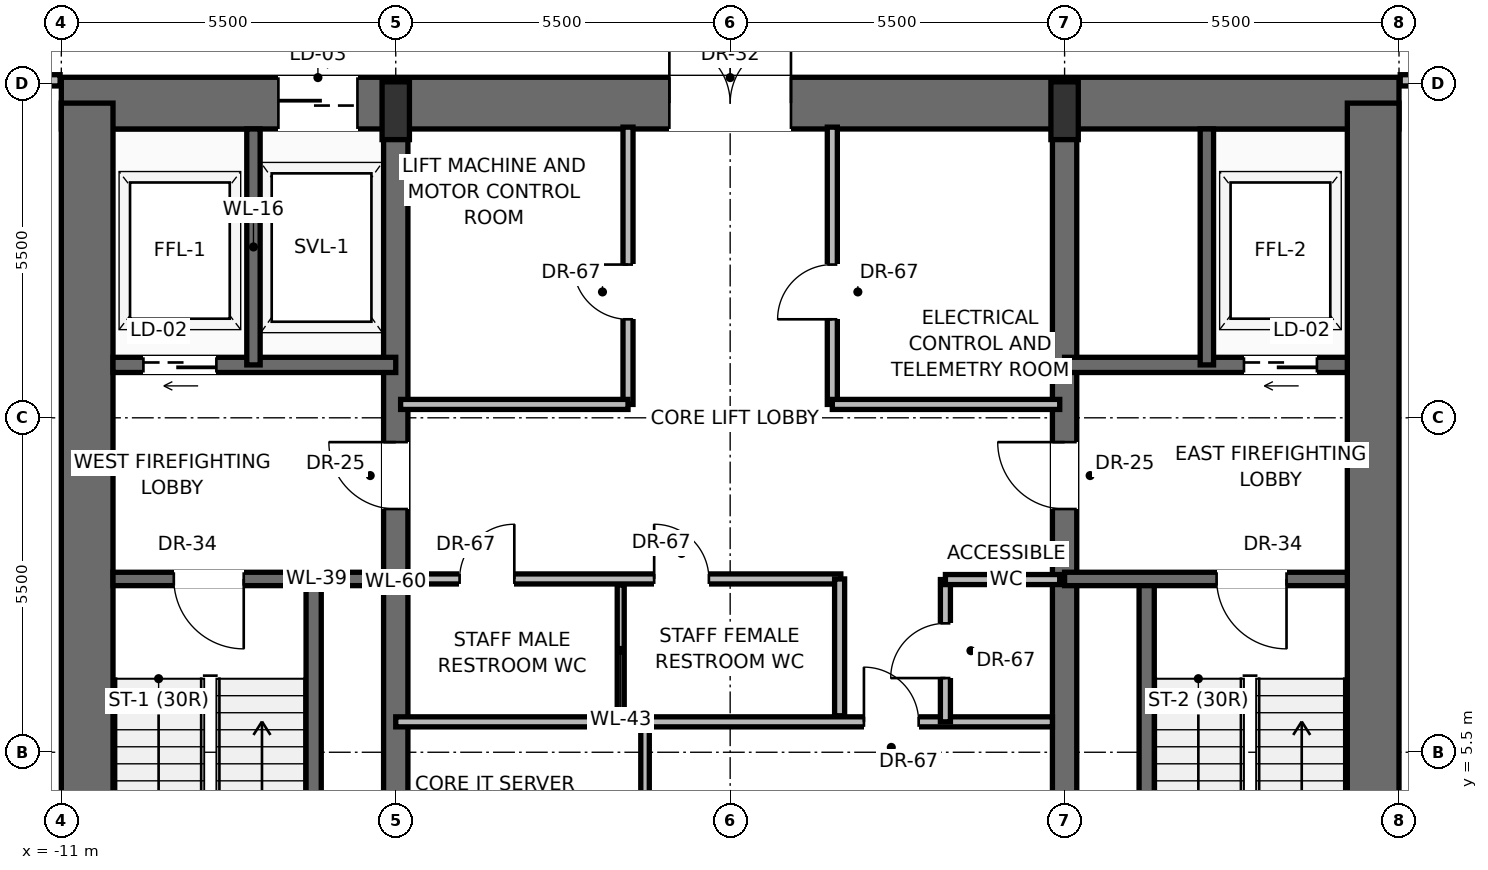
"""IFC4 building model, lengths in metres.
Left out: names, types, materials, properties, quantities, classifications, styles, units other than length and angle.
Written with IfcOpenShell. Run it as: python <this file> out.ifc"""

import sys

from ifc_helpers import new_model, si_unit, direction, frame, frame_2d, origin, origin_2d, place, context, subcontext, project, spatial, rectangle, extrude, source, transform, mapped, element, fill, save


model = new_model("IFC4")
c1 = context("Model", 3, precision=1e-05, world=origin(), true_north=direction((0.0, 1.0)))
c2 = subcontext(c1, "Body", "Model", "MODEL_VIEW")
j1 = project(units=[si_unit("LENGTHUNIT", "METRE"), si_unit("PLANEANGLEUNIT", "RADIAN")], contexts=[c1])
p1 = place(None, origin())
s1 = spatial("IfcSite", under=j1, at=p1, CompositionType="ELEMENT")
p2 = place(p1, origin())
s2 = spatial("IfcBuilding", under=s1, at=p2, CompositionType="ELEMENT")
p3 = place(p2, frame((0.0, 0.0, -10.0)))
s3 = spatial("IfcBuildingStorey", under=s2, at=p3, CompositionType="ELEMENT", Elevation=-10.0)
p4 = place(p3, frame((-11.0, 16.175, 0.0), z_axis=(0.0, 0.0, 1.0), x_axis=(1.0, 0.0, 0.0)))
e1 = element("IfcWall", 1, at=p4, inside=s3, PredefinedType="SHEAR", context=c2, shape_type="SweptSolid", body=[
    extrude(rectangle(XDim=22.0, YDim=0.85, at=frame_2d((11.0, 0.0))), origin(), (0.0, 0.0, 1.0), 4.6),
])
p5 = place(p4, frame((3.57, 0.0, 0.0)))
e2 = element("IfcOpeningElement", 2, at=p5, cuts=e1, PredefinedType="OPENING", context=c2, shape_type="SweptSolid", body=[
    extrude(rectangle(XDim=1.3, YDim=2.3, at=frame_2d((0.65, 1.15))), frame((0.0, 0.435, 0.0), z_axis=(0.0, -1.0, 0.0), x_axis=(1.0, 0.0, 0.0)), (0.0, 0.0, 1.0), 0.87),
])
p6 = place(p4, frame((10.0, 0.0, 0.0)))
e3 = element("IfcOpeningElement", 3, at=p6, cuts=e1, PredefinedType="OPENING", context=c2, shape_type="SweptSolid", body=[
    extrude(rectangle(XDim=2.0, YDim=2.4, at=frame_2d((1.0, 1.2))), frame((0.0, 0.435, 0.0), z_axis=(0.0, -1.0, 0.0), x_axis=(1.0, 0.0, 0.0)), (0.0, 0.0, 1.0), 0.87),
])
for number, where, z_axis, x_axis in (
    (4, (-10.575, 0.425, 0.0), (0.0, 0.0, 1.0), (0.0, 1.0, 0.0)),
    (5, (10.575, 0.425, 0.0), (0.0, 0.0, 1.0), (0.0, 1.0, 0.0)),
):
    element("IfcWall", number, at=place(p3, frame(where, z_axis=z_axis, x_axis=x_axis)), inside=s3, PredefinedType="SHEAR", context=c2, shape_type="SweptSolid", body=[
        extrude(rectangle(XDim=15.75, YDim=0.85, at=frame_2d((7.875, 0.0))), origin(), (0.0, 0.0, 1.0), 4.6),
    ])
p7 = place(p3, frame((-5.5, 0.425, 0.0), z_axis=(0.0, 0.0, 1.0), x_axis=(0.0, 1.0, 0.0)))
e6 = element("IfcWall", 6, at=p7, inside=s3, PredefinedType="SHEAR", context=c2, shape_type="SweptSolid", body=[
    extrude(rectangle(XDim=15.75, YDim=0.4, at=frame_2d((7.875, 0.0))), origin(), (0.0, 0.0, 1.0), 4.6),
])
p8 = place(p7, frame((9.075, 0.0, 0.0)))
e7 = element("IfcOpeningElement", 7, at=p8, cuts=e6, PredefinedType="OPENING", context=c2, shape_type="SweptSolid", body=[
    extrude(rectangle(XDim=1.1, YDim=2.2, at=frame_2d((0.55, 1.1))), frame((0.0, 0.21, 0.0), z_axis=(0.0, -1.0, 0.0), x_axis=(1.0, 0.0, 0.0)), (0.0, 0.0, 1.0), 0.42),
])
p9 = place(p3, frame((5.5, 0.425, 0.0), z_axis=(0.0, 0.0, 1.0), x_axis=(0.0, 1.0, 0.0)))
e8 = element("IfcWall", 8, at=p9, inside=s3, PredefinedType="SHEAR", context=c2, shape_type="SweptSolid", body=[
    extrude(rectangle(XDim=15.75, YDim=0.4, at=frame_2d((7.875, 0.0))), origin(), (0.0, 0.0, 1.0), 4.6),
])
p10 = place(p9, frame((9.075, 0.0, 0.0)))
e9 = element("IfcOpeningElement", 9, at=p10, cuts=e8, PredefinedType="OPENING", context=c2, shape_type="SweptSolid", body=[
    extrude(rectangle(XDim=1.1, YDim=2.2, at=frame_2d((0.55, 1.1))), frame((0.0, 0.21, 0.0), z_axis=(0.0, -1.0, 0.0), x_axis=(1.0, 0.0, 0.0)), (0.0, 0.0, 1.0), 0.42),
])
m1 = source(origin(), c2, "Body", "SweptSolid", [
    extrude(rectangle(XDim=0.45, YDim=0.95, at=origin_2d()), origin(), (0.0, 0.0, 1.0), 5.0),
])
for number, where, z_axis, x_axis in (
    (10, (-5.5, 16.05, 0.0), (0.0, 0.0, 1.0), (1.0, 0.0, 0.0)),
    (11, (5.5, 16.05, 0.0), (0.0, 0.0, 1.0), (1.0, 0.0, 0.0)),
):
    element("IfcColumn", number, at=place(p3, frame(where, z_axis=z_axis, x_axis=x_axis)), inside=s3, PredefinedType="PILASTER", context=c2, shape_type="MappedRepresentation", body=[
        mapped(m1, transform((0.0, 0.0, 0.0), scale=1.0)),
    ])
p11 = place(p3, frame((-6.85, 0.85, 0.0), z_axis=(0.0, 0.0, 1.0), x_axis=(0.0, 1.0, 0.0)))
e12 = element("IfcWall", 12, at=p11, inside=s3, PredefinedType="SOLIDWALL", context=c2, shape_type="SweptSolid", body=[
    extrude(rectangle(XDim=7.5, YDim=0.25, at=frame_2d((3.75, 0.0))), origin(), (0.0, 0.0, 1.0), 4.6),
])
p12 = place(p3, frame((-5.5, 8.35, 0.0), z_axis=(0.0, 0.0, 1.0), x_axis=(-1.0, 0.0, 0.0)))
e13 = element("IfcWall", 13, at=p12, inside=s3, PredefinedType="SOLIDWALL", context=c2, shape_type="SweptSolid", body=[
    extrude(rectangle(XDim=4.65, YDim=0.22, at=frame_2d((2.325, 0.0))), origin(), (0.0, 0.0, 1.0), 4.6),
])
p13 = place(p12, frame((2.5, 0.0, 0.0)))
e14 = element("IfcOpeningElement", 14, at=p13, cuts=e13, PredefinedType="OPENING", context=c2, shape_type="SweptSolid", body=[
    extrude(rectangle(XDim=1.15, YDim=2.2, at=frame_2d((0.575, 1.1))), frame((0.0, 0.12, 0.0), z_axis=(0.0, -1.0, 0.0), x_axis=(1.0, 0.0, 0.0)), (0.0, 0.0, 1.0), 0.24),
])
p14 = place(p3, frame((-5.5, 11.87, 0.0), z_axis=(0.0, 0.0, 1.0), x_axis=(-1.0, 0.0, 0.0)))
e15 = element("IfcWall", 15, at=p14, inside=s3, PredefinedType="SOLIDWALL", context=c2, shape_type="SweptSolid", body=[
    extrude(rectangle(XDim=4.65, YDim=0.25, at=frame_2d((2.325, 0.0))), origin(), (0.0, 0.0, 1.0), 4.6),
])
p15 = place(p14, frame((2.95, 0.0, 0.0)))
e16 = element("IfcOpeningElement", 16, at=p15, cuts=e15, PredefinedType="OPENING", context=c2, shape_type="SweptSolid", body=[
    extrude(rectangle(XDim=1.2, YDim=2.25, at=frame_2d((0.6, 1.125))), frame((0.0, 0.135, 0.0), z_axis=(0.0, -1.0, 0.0), x_axis=(1.0, 0.0, 0.0)), (0.0, 0.0, 1.0), 0.27),
])
p16 = place(p3, frame((-7.84, 11.87, 0.0), z_axis=(0.0, 0.0, 1.0), x_axis=(0.0, 1.0, 0.0)))
e17 = element("IfcWall", 17, at=p16, inside=s3, PredefinedType="SOLIDWALL", context=c2, shape_type="SweptSolid", body=[
    extrude(rectangle(XDim=3.88, YDim=0.22, at=frame_2d((1.94, 0.0))), origin(), (0.0, 0.0, 1.0), 4.6),
])
p17 = place(p3, frame((6.85, 0.85, 0.0), z_axis=(0.0, 0.0, 1.0), x_axis=(0.0, 1.0, 0.0)))
e18 = element("IfcWall", 18, at=p17, inside=s3, PredefinedType="SOLIDWALL", context=c2, shape_type="SweptSolid", body=[
    extrude(rectangle(XDim=7.5, YDim=0.25, at=frame_2d((3.75, 0.0))), origin(), (0.0, 0.0, 1.0), 4.6),
])
p18 = place(p3, frame((10.15, 8.35, 0.0), z_axis=(0.0, 0.0, 1.0), x_axis=(-1.0, 0.0, 0.0)))
e19 = element("IfcWall", 19, at=p18, inside=s3, PredefinedType="SOLIDWALL", context=c2, shape_type="SweptSolid", body=[
    extrude(rectangle(XDim=4.65, YDim=0.22, at=frame_2d((2.325, 0.0))), origin(), (0.0, 0.0, 1.0), 4.6),
])
p19 = place(p18, frame((1.0, 0.0, 0.0)))
e20 = element("IfcOpeningElement", 20, at=p19, cuts=e19, PredefinedType="OPENING", context=c2, shape_type="SweptSolid", body=[
    extrude(rectangle(XDim=1.15, YDim=2.2, at=frame_2d((0.575, 1.1))), frame((0.0, 0.12, 0.0), z_axis=(0.0, -1.0, 0.0), x_axis=(1.0, 0.0, 0.0)), (0.0, 0.0, 1.0), 0.24),
])
p20 = place(p3, frame((10.15, 11.87, 0.0), z_axis=(0.0, 0.0, 1.0), x_axis=(-1.0, 0.0, 0.0)))
e21 = element("IfcWall", 21, at=p20, inside=s3, PredefinedType="SOLIDWALL", context=c2, shape_type="SweptSolid", body=[
    extrude(rectangle(XDim=4.65, YDim=0.25, at=frame_2d((2.325, 0.0))), origin(), (0.0, 0.0, 1.0), 4.6),
])
p21 = place(p20, frame((0.5, 0.0, 0.0)))
e22 = element("IfcOpeningElement", 22, at=p21, cuts=e21, PredefinedType="OPENING", context=c2, shape_type="SweptSolid", body=[
    extrude(rectangle(XDim=1.2, YDim=2.25, at=frame_2d((0.6, 1.125))), frame((0.0, 0.135, 0.0), z_axis=(0.0, -1.0, 0.0), x_axis=(1.0, 0.0, 0.0)), (0.0, 0.0, 1.0), 0.27),
])
p22 = place(p3, frame((7.84, 11.87, 0.0), z_axis=(0.0, 0.0, 1.0), x_axis=(0.0, 1.0, 0.0)))
e23 = element("IfcWall", 23, at=p22, inside=s3, PredefinedType="SOLIDWALL", context=c2, shape_type="SweptSolid", body=[
    extrude(rectangle(XDim=3.88, YDim=0.22, at=frame_2d((1.94, 0.0))), origin(), (0.0, 0.0, 1.0), 4.6),
])
p23 = place(p3, frame((-5.5, 6.0, 0.0), z_axis=(0.0, 0.0, 1.0), x_axis=(1.0, 0.0, 0.0)))
e24 = element("IfcWall", 24, at=p23, inside=s3, PredefinedType="PARTITIONING", context=c2, shape_type="SweptSolid", body=[
    extrude(rectangle(XDim=10.8, YDim=0.165, at=frame_2d((5.4, 0.0))), origin(), (0.0, 0.0, 1.0), 4.592),
])
p24 = place(p23, frame((7.7, 0.0, 0.0)))
e25 = element("IfcOpeningElement", 25, at=p24, cuts=e24, PredefinedType="OPENING", context=c2, shape_type="SweptSolid", body=[
    extrude(rectangle(XDim=0.9, YDim=2.1, at=frame_2d((0.45, 1.05))), frame((0.0, 0.093, 0.0), z_axis=(0.0, -1.0, 0.0), x_axis=(1.0, 0.0, 0.0)), (0.0, 0.0, 1.0), 0.185),
])
p25 = place(p3, frame((-1.4, 0.85, 0.0), z_axis=(0.0, 0.0, 1.0), x_axis=(0.0, 1.0, 0.0)))
e26 = element("IfcWall", 26, at=p25, inside=s3, PredefinedType="PARTITIONING", context=c2, shape_type="SweptSolid", body=[
    extrude(rectangle(XDim=5.03, YDim=0.14, at=frame_2d((2.515, 0.0))), origin(), (0.0, 0.0, 1.0), 4.592),
])
p26 = place(p25, frame((2.1, 0.0, 0.0)))
e27 = element("IfcOpeningElement", 27, at=p26, cuts=e26, PredefinedType="OPENING", context=c2, shape_type="SweptSolid", body=[
    extrude(rectangle(XDim=0.9, YDim=2.1, at=frame_2d((0.45, 1.05))), frame((0.0, 0.08, 0.0), z_axis=(0.0, -1.0, 0.0), x_axis=(1.0, 0.0, 0.0)), (0.0, 0.0, 1.0), 0.16),
])
p27 = place(p3, frame((3.54, 6.0, 0.0), z_axis=(0.0, 0.0, 1.0), x_axis=(0.0, 1.0, 0.0)))
e28 = element("IfcWall", 28, at=p27, inside=s3, PredefinedType="PARTITIONING", context=c2, shape_type="SweptSolid", body=[
    extrude(rectangle(XDim=2.34, YDim=0.165, at=frame_2d((1.17, 0.0))), origin(), (0.0, 0.0, 1.0), 4.592),
])
p28 = place(p27, frame((0.72, 0.0, 0.0)))
e29 = element("IfcOpeningElement", 29, at=p28, cuts=e28, PredefinedType="OPENING", context=c2, shape_type="SweptSolid", body=[
    extrude(rectangle(XDim=0.9, YDim=2.1, at=frame_2d((0.45, 1.05))), frame((0.0, 0.093, 0.0), z_axis=(0.0, -1.0, 0.0), x_axis=(1.0, 0.0, 0.0)), (0.0, 0.0, 1.0), 0.185),
])
p29 = place(p3, frame((3.54, 8.34, 0.0), z_axis=(0.0, 0.0, 1.0), x_axis=(1.0, 0.0, 0.0)))
e30 = element("IfcWall", 30, at=p29, inside=s3, PredefinedType="PARTITIONING", context=c2, shape_type="SweptSolid", body=[
    extrude(rectangle(XDim=1.88, YDim=0.165, at=frame_2d((0.94, 0.0))), origin(), (0.0, 0.0, 1.0), 4.592),
])
p30 = place(p3, frame((-5.3, 8.35, 0.0), z_axis=(0.0, 0.0, 1.0), x_axis=(1.0, 0.0, 0.0)))
e31 = element("IfcWall", 31, at=p30, inside=s3, PredefinedType="PARTITIONING", context=c2, shape_type="SweptSolid", body=[
    extrude(rectangle(XDim=7.12, YDim=0.165, at=frame_2d((3.56, 0.0))), origin(), (0.0, 0.0, 1.0), 4.592),
])
p31 = place(p30, frame((0.85, 0.0, 0.0)))
e32 = element("IfcOpeningElement", 32, at=p31, cuts=e31, PredefinedType="OPENING", context=c2, shape_type="SweptSolid", body=[
    extrude(rectangle(XDim=0.9, YDim=2.1, at=frame_2d((0.45, 1.05))), frame((0.0, 0.093, 0.0), z_axis=(0.0, -1.0, 0.0), x_axis=(1.0, 0.0, 0.0)), (0.0, 0.0, 1.0), 0.185),
])
p32 = place(p30, frame((4.05, 0.0, 0.0)))
e33 = element("IfcOpeningElement", 33, at=p32, cuts=e31, PredefinedType="OPENING", context=c2, shape_type="SweptSolid", body=[
    extrude(rectangle(XDim=0.9, YDim=2.1, at=frame_2d((0.45, 1.05))), frame((0.0, 0.093, 0.0), z_axis=(0.0, -1.0, 0.0), x_axis=(1.0, 0.0, 0.0)), (0.0, 0.0, 1.0), 0.185),
])
p33 = place(p3, frame((1.8, 6.1, 0.0), z_axis=(0.0, 0.0, 1.0), x_axis=(0.0, 1.0, 0.0)))
e34 = element("IfcWall", 34, at=p33, inside=s3, PredefinedType="PARTITIONING", context=c2, shape_type="SweptSolid", body=[
    extrude(rectangle(XDim=2.25, YDim=0.165, at=frame_2d((1.125, 0.0))), origin(), (0.0, 0.0, 1.0), 4.592),
])
p34 = place(p3, frame((-1.8, 6.1, 0.0), z_axis=(0.0, 0.0, 1.0), x_axis=(0.0, 1.0, 0.0)))
e35 = element("IfcWall", 35, at=p34, inside=s3, PredefinedType="PARTITIONING", context=c2, shape_type="SweptSolid", body=[
    extrude(rectangle(XDim=2.15, YDim=0.115, at=frame_2d((1.075, 0.0))), origin(), (0.0, 0.0, 1.0), 4.592),
])
p35 = place(p3, frame((-1.68, 11.22, 0.0), z_axis=(0.0, 0.0, 1.0), x_axis=(0.0, 1.0, 0.0)))
e36 = element("IfcWall", 36, at=p35, inside=s3, PredefinedType="PARTITIONING", context=c2, shape_type="SweptSolid", body=[
    extrude(rectangle(XDim=4.56, YDim=0.165, at=frame_2d((2.28, 0.0))), origin(), (0.0, 0.0, 1.0), 4.592),
])
p36 = place(p35, frame((1.4, 0.0, 0.0)))
e37 = element("IfcOpeningElement", 37, at=p36, cuts=e36, PredefinedType="OPENING", context=c2, shape_type="SweptSolid", body=[
    extrude(rectangle(XDim=0.9, YDim=2.1, at=frame_2d((0.45, 1.05))), frame((0.0, 0.093, 0.0), z_axis=(0.0, -1.0, 0.0), x_axis=(1.0, 0.0, 0.0)), (0.0, 0.0, 1.0), 0.185),
])
p37 = place(p3, frame((-5.42, 11.22, 0.0), z_axis=(0.0, 0.0, 1.0), x_axis=(1.0, 0.0, 0.0)))
e38 = element("IfcWall", 38, at=p37, inside=s3, PredefinedType="PARTITIONING", context=c2, shape_type="SweptSolid", body=[
    extrude(rectangle(XDim=3.74, YDim=0.165, at=frame_2d((1.87, 0.0))), origin(), (0.0, 0.0, 1.0), 4.592),
])
p38 = place(p3, frame((1.68, 11.22, 0.0), z_axis=(0.0, 0.0, 1.0), x_axis=(0.0, 1.0, 0.0)))
e39 = element("IfcWall", 39, at=p38, inside=s3, PredefinedType="PARTITIONING", context=c2, shape_type="SweptSolid", body=[
    extrude(rectangle(XDim=4.56, YDim=0.165, at=frame_2d((2.28, 0.0))), origin(), (0.0, 0.0, 1.0), 4.592),
])
p39 = place(p38, frame((1.4, 0.0, 0.0)))
e40 = element("IfcOpeningElement", 40, at=p39, cuts=e39, PredefinedType="OPENING", context=c2, shape_type="SweptSolid", body=[
    extrude(rectangle(XDim=0.9, YDim=2.1, at=frame_2d((0.45, 1.05))), frame((0.0, 0.093, 0.0), z_axis=(0.0, -1.0, 0.0), x_axis=(1.0, 0.0, 0.0)), (0.0, 0.0, 1.0), 0.185),
])
p40 = place(p3, frame((1.68, 11.22, 0.0), z_axis=(0.0, 0.0, 1.0), x_axis=(1.0, 0.0, 0.0)))
e41 = element("IfcWall", 41, at=p40, inside=s3, PredefinedType="PARTITIONING", context=c2, shape_type="SweptSolid", body=[
    extrude(rectangle(XDim=3.74, YDim=0.165, at=frame_2d((1.87, 0.0))), origin(), (0.0, 0.0, 1.0), 4.592),
])
p41 = place(p3, frame((-36.49, 16.55, 0.0), z_axis=(0.0, 0.0, 1.0), x_axis=(1.0, 0.0, 0.0)))
e42 = element("IfcWall", 42, at=p41, inside=s3, PredefinedType="PARTITIONING", context=c2, shape_type="SweptSolid", body=[
    extrude(rectangle(XDim=25.47, YDim=0.185, at=frame_2d((12.735, 0.0))), origin(), (0.0, 0.0, 1.0), 3.552),
])
p42 = place(p41, frame((11.985, 0.0, 0.0)))
e43 = element("IfcOpeningElement", 43, at=p42, cuts=e42, PredefinedType="OPENING", context=c2, shape_type="SweptSolid", body=[
    extrude(rectangle(XDim=1.5, YDim=2.25, at=frame_2d((0.75, 1.125))), frame((0.0, 0.103, 0.0), z_axis=(0.0, -1.0, 0.0), x_axis=(1.0, 0.0, 0.0)), (0.0, 0.0, 1.0), 0.205),
])
p43 = place(p3, frame((11.02, 16.55, 0.0), z_axis=(0.0, 0.0, 1.0), x_axis=(1.0, 0.0, 0.0)))
e44 = element("IfcWall", 44, at=p43, inside=s3, PredefinedType="PARTITIONING", context=c2, shape_type="SweptSolid", body=[
    extrude(rectangle(XDim=25.47, YDim=0.185, at=frame_2d((12.735, 0.0))), origin(), (0.0, 0.0, 1.0), 3.552),
])
p44 = place(p43, frame((11.985, 0.0, 0.0)))
e45 = element("IfcOpeningElement", 45, at=p44, cuts=e44, PredefinedType="OPENING", context=c2, shape_type="SweptSolid", body=[
    extrude(rectangle(XDim=1.5, YDim=2.25, at=frame_2d((0.75, 1.125))), frame((0.0, 0.103, 0.0), z_axis=(0.0, -1.0, 0.0), x_axis=(1.0, 0.0, 0.0)), (0.0, 0.0, 1.0), 0.205),
])
m2 = source(origin(), c2, "Body", "SweptSolid", [
    extrude(rectangle(XDim=1.15, YDim=2.2, at=frame_2d((0.575, 1.1))), frame((0.0, 0.025, 0.0), z_axis=(0.0, -1.0, 0.0), x_axis=(1.0, 0.0, 0.0)), (0.0, 0.0, 1.0), 0.05),
])
p45 = place(p13, origin())
e46 = element("IfcDoor", 46, at=p45, inside=s3, OperationType="SINGLE_SWING_LEFT", PredefinedType="DOOR", context=c2, shape_type="MappedRepresentation", body=[
    mapped(m2, transform((0.0, 0.0, 0.0), scale=1.0)),
])
fill(e14, e46)
m3 = source(origin(), c2, "Body", "SweptSolid", [
    extrude(rectangle(XDim=1.1, YDim=2.2, at=frame_2d((0.55, 1.1))), frame((0.0, 0.025, 0.0), z_axis=(0.0, -1.0, 0.0), x_axis=(1.0, 0.0, 0.0)), (0.0, 0.0, 1.0), 0.05),
])
p46 = place(p8, origin())
e47 = element("IfcDoor", 47, at=p46, inside=s3, OperationType="SINGLE_SWING_RIGHT", PredefinedType="DOOR", context=c2, shape_type="MappedRepresentation", body=[
    mapped(m3, transform((0.0, 0.0, 0.0), scale=1.0)),
])
fill(e7, e47)
m4 = source(origin(), c2, "Body", "SweptSolid", [
    extrude(rectangle(XDim=1.2, YDim=2.25, at=frame_2d((0.6, 1.125))), frame((0.0, 0.025, 0.0), z_axis=(0.0, -1.0, 0.0), x_axis=(1.0, 0.0, 0.0)), (0.0, 0.0, 1.0), 0.05),
])
p47 = place(p15, origin())
e48 = element("IfcDoor", 48, at=p47, inside=s3, OperationType="SLIDING_TO_LEFT", PredefinedType="DOOR", context=c2, shape_type="MappedRepresentation", body=[
    mapped(m4, transform((0.0, 0.0, 0.0), scale=1.0)),
])
fill(e16, e48)
m5 = source(origin(), c2, "Body", "SweptSolid", [
    extrude(rectangle(XDim=1.3, YDim=2.3, at=frame_2d((0.65, 1.15))), frame((0.0, 0.025, 0.0), z_axis=(0.0, -1.0, 0.0), x_axis=(1.0, 0.0, 0.0)), (0.0, 0.0, 1.0), 0.05),
])
p48 = place(p5, origin())
e49 = element("IfcDoor", 49, at=p48, inside=s3, OperationType="SLIDING_TO_RIGHT", PredefinedType="DOOR", context=c2, shape_type="MappedRepresentation", body=[
    mapped(m5, transform((0.0, 0.0, 0.0), scale=1.0)),
])
fill(e2, e49)
p49 = place(p19, origin())
e50 = element("IfcDoor", 50, at=p49, inside=s3, OperationType="SINGLE_SWING_LEFT", PredefinedType="DOOR", context=c2, shape_type="MappedRepresentation", body=[
    mapped(m2, transform((0.0, 0.0, 0.0), scale=1.0)),
])
fill(e20, e50)
p50 = place(p10, origin())
e51 = element("IfcDoor", 51, at=p50, inside=s3, OperationType="SINGLE_SWING_RIGHT", PredefinedType="DOOR", context=c2, shape_type="MappedRepresentation", body=[
    mapped(m3, transform((0.0, 0.0, 0.0), scale=1.0)),
])
fill(e9, e51)
p51 = place(p21, origin())
e52 = element("IfcDoor", 52, at=p51, inside=s3, OperationType="SLIDING_TO_RIGHT", PredefinedType="DOOR", context=c2, shape_type="MappedRepresentation", body=[
    mapped(m4, transform((0.0, 0.0, 0.0), scale=1.0)),
])
fill(e22, e52)
m6 = source(origin(), c2, "Body", "SweptSolid", [
    extrude(rectangle(XDim=2.0, YDim=2.4, at=frame_2d((1.0, 1.2))), frame((0.0, 0.025, 0.0), z_axis=(0.0, -1.0, 0.0), x_axis=(1.0, 0.0, 0.0)), (0.0, 0.0, 1.0), 0.05),
])
p52 = place(p6, origin())
e53 = element("IfcDoor", 53, at=p52, inside=s3, OperationType="DOUBLE_DOOR_SINGLE_SWING", PredefinedType="DOOR", context=c2, shape_type="MappedRepresentation", body=[
    mapped(m6, transform((0.0, 0.0, 0.0), scale=1.0)),
])
fill(e3, e53)
m7 = source(origin(), c2, "Body", "SweptSolid", [
    extrude(rectangle(XDim=0.9, YDim=2.1, at=frame_2d((0.45, 1.05))), frame((0.0, 0.025, 0.0), z_axis=(0.0, -1.0, 0.0), x_axis=(1.0, 0.0, 0.0)), (0.0, 0.0, 1.0), 0.05),
])
p53 = place(p24, origin())
e54 = element("IfcDoor", 54, at=p53, inside=s3, OperationType="SINGLE_SWING_LEFT", PredefinedType="DOOR", context=c2, shape_type="MappedRepresentation", body=[
    mapped(m7, transform((0.0, 0.0, 0.0), scale=1.0)),
])
fill(e25, e54)
p54 = place(p28, origin())
e55 = element("IfcDoor", 55, at=p54, inside=s3, OperationType="SINGLE_SWING_LEFT", PredefinedType="DOOR", context=c2, shape_type="MappedRepresentation", body=[
    mapped(m7, transform((0.0, 0.0, 0.0), scale=1.0)),
])
fill(e29, e55)
p55 = place(p31, origin())
e56 = element("IfcDoor", 56, at=p55, inside=s3, OperationType="SINGLE_SWING_RIGHT", PredefinedType="DOOR", context=c2, shape_type="MappedRepresentation", body=[
    mapped(m7, transform((0.0, 0.0, 0.0), scale=1.0)),
])
fill(e32, e56)
p56 = place(p32, origin())
e57 = element("IfcDoor", 57, at=p56, inside=s3, OperationType="SINGLE_SWING_LEFT", PredefinedType="DOOR", context=c2, shape_type="MappedRepresentation", body=[
    mapped(m7, transform((0.0, 0.0, 0.0), scale=1.0)),
])
fill(e33, e57)
p57 = place(p36, origin())
e58 = element("IfcDoor", 58, at=p57, inside=s3, OperationType="SINGLE_SWING_RIGHT", PredefinedType="DOOR", context=c2, shape_type="MappedRepresentation", body=[
    mapped(m7, transform((0.0, 0.0, 0.0), scale=1.0)),
])
fill(e37, e58)
p58 = place(p39, origin())
e59 = element("IfcDoor", 59, at=p58, inside=s3, OperationType="SINGLE_SWING_LEFT", PredefinedType="DOOR", context=c2, shape_type="MappedRepresentation", body=[
    mapped(m7, transform((0.0, 0.0, 0.0), scale=1.0)),
])
fill(e40, e59)
save(model, sys.argv[1])
